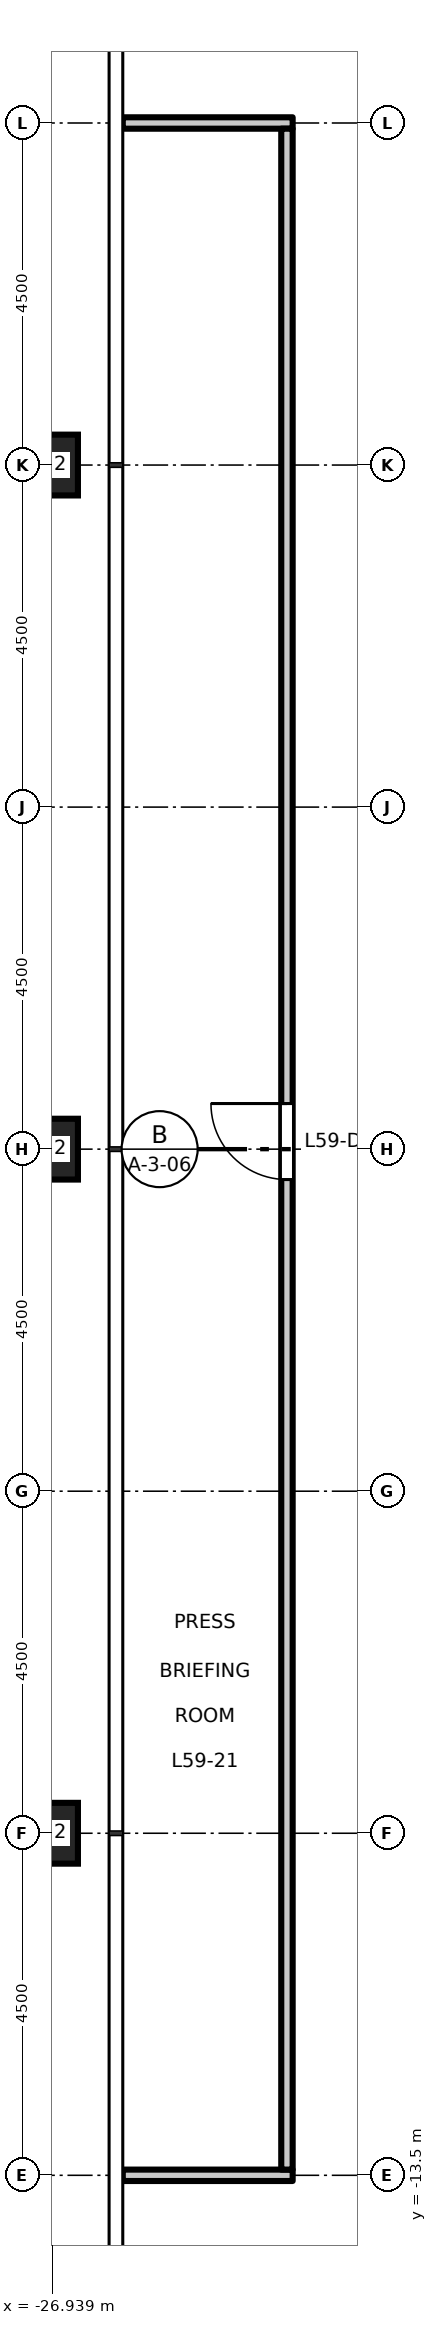
"""IFC4 building model, lengths in metres.
Left out: names, types, materials, properties, quantities, classifications, styles, units other than length and angle.
Written with IfcOpenShell. Run it as: python <this file> out.ifc"""

import sys

from ifc_helpers import new_model, si_unit, direction, frame, frame_2d, origin, origin_2d, place, context, subcontext, project, spatial, rectangle, hollow_rectangle, extrude, element, fill, save


model = new_model("IFC4")
c1 = context("Model", 3, precision=1e-05, world=origin(), true_north=direction((0.0, 1.0)))
c2 = subcontext(c1, "Body", "Model", "MODEL_VIEW")
j1 = project(units=[si_unit("LENGTHUNIT", "METRE"), si_unit("PLANEANGLEUNIT", "RADIAN")], contexts=[c1])
p1 = place(None, origin())
s1 = spatial("IfcSite", under=j1, at=p1, CompositionType="ELEMENT")
p2 = place(p1, origin())
s2 = spatial("IfcBuilding", under=s1, at=p2, CompositionType="ELEMENT")
p3 = place(p2, frame((0.0, 0.0, 273.7)))
s3 = spatial("IfcBuildingStorey", under=s2, at=p3, CompositionType="ELEMENT", Elevation=273.7)
for number, where, z_axis, x_axis in (
    (1, (-27.0, 9.0, 0.0), (0.0, 0.0, 1.0), (1.0, 0.0, 0.0)),
    (2, (-27.0, 0.0, 0.0), (0.0, 0.0, 1.0), (1.0, 0.0, 0.0)),
    (3, (-27.0, -9.0, 0.0), (0.0, 0.0, 1.0), (1.0, 0.0, 0.0)),
):
    element("IfcColumn", number, at=place(p3, frame(where, z_axis=z_axis, x_axis=x_axis)), inside=s3, PredefinedType="COLUMN", context=c2, shape_type="SweptSolid", body=[
        extrude(hollow_rectangle(XDim=0.8, YDim=0.8, WallThickness=0.045, at=origin_2d()), origin(), (0.0, 0.0, 1.0), 4.5),
    ])
p4 = place(p3, frame((-26.01, -13.5, 0.0), z_axis=(0.0, 0.0, 1.0), x_axis=(1.0, 0.0, 0.0)))
e4 = element("IfcWall", 4, at=p4, inside=s3, PredefinedType="PARTITIONING", context=c2, shape_type="SweptSolid", body=[
    extrude(rectangle(XDim=2.235, YDim=0.15, at=frame_2d((1.118, 0.0))), origin(), (0.0, 0.0, 1.0), 3.9),
])
p5 = place(p3, frame((-26.01, 13.5, 0.0), z_axis=(0.0, 0.0, 1.0), x_axis=(1.0, 0.0, 0.0)))
e5 = element("IfcWall", 5, at=p5, inside=s3, PredefinedType="PARTITIONING", context=c2, shape_type="SweptSolid", body=[
    extrude(rectangle(XDim=2.235, YDim=0.15, at=frame_2d((1.118, 0.0))), origin(), (0.0, 0.0, 1.0), 4.3),
])
p6 = place(p3, frame((-23.85, -13.425, 0.0), z_axis=(0.0, 0.0, 1.0), x_axis=(0.0, 1.0, 0.0)))
e6 = element("IfcWall", 6, at=p6, inside=s3, PredefinedType="PARTITIONING", context=c2, shape_type="SweptSolid", body=[
    extrude(rectangle(XDim=26.85, YDim=0.15, at=frame_2d((13.425, 0.0))), origin(), (0.0, 0.0, 1.0), 4.3),
])
p7 = place(p6, frame((13.025, 0.0, 0.0)))
e7 = element("IfcOpeningElement", 7, at=p7, cuts=e6, PredefinedType="OPENING", context=c2, shape_type="SweptSolid", body=[
    extrude(rectangle(XDim=1.0, YDim=2.1, at=frame_2d((0.5, 1.05))), frame((0.0, 0.085, 0.0), z_axis=(0.0, -1.0, 0.0), x_axis=(1.0, 0.0, 0.0)), (0.0, 0.0, 1.0), 0.17),
])
p8 = place(p7, origin())
e8 = element("IfcDoor", 8, at=p8, inside=s3, OperationType="SINGLE_SWING_RIGHT", PredefinedType="DOOR", context=c2, shape_type="SweptSolid", body=[
    extrude(rectangle(XDim=1.0, YDim=2.1, at=frame_2d((0.5, 1.05))), frame((0.0, 0.025, 0.0), z_axis=(0.0, -1.0, 0.0), x_axis=(1.0, 0.0, 0.0)), (0.0, 0.0, 1.0), 0.05),
])
fill(e7, e8)
save(model, sys.argv[1])
